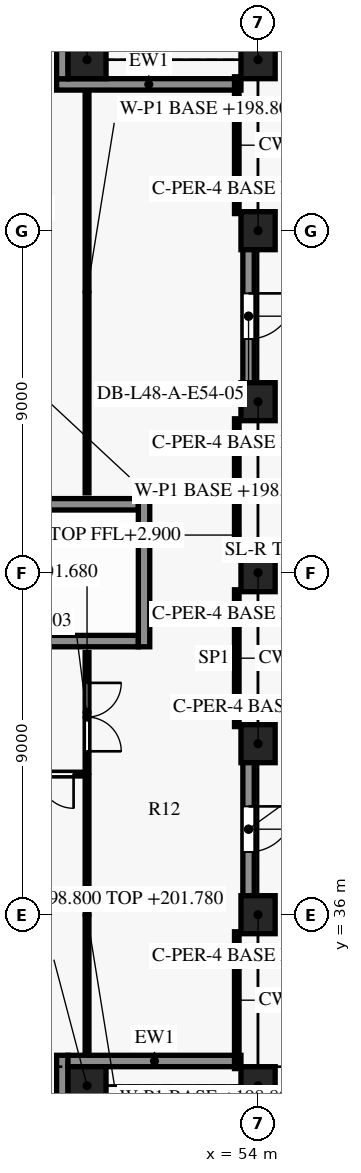
"""IFC4 building model, lengths in metres.
Left out: names, types, materials, properties, quantities, classifications, styles, units other than length and angle.
Written with IfcOpenShell. Run it as: python <this file> out.ifc"""

import sys

from ifc_helpers import new_model, si_unit, direction, frame, frame_2d, origin, origin_2d, place, context, subcontext, project, spatial, rectangle, extrude, element, fill, save


model = new_model("IFC4")
c1 = context("Model", 3, precision=1e-05, world=origin(), true_north=direction((0.0, 1.0)))
c2 = subcontext(c1, "Body", "Model", "MODEL_VIEW")
j1 = project(units=[si_unit("LENGTHUNIT", "METRE"), si_unit("PLANEANGLEUNIT", "RADIAN")], contexts=[c1])
p1 = place(None, origin())
s1 = spatial("IfcSite", under=j1, at=p1, CompositionType="ELEMENT")
p2 = place(p1, origin())
s2 = spatial("IfcBuilding", under=s1, at=p2, CompositionType="ELEMENT")
p3 = place(p2, frame((0.0, 0.0, 198.8)))
s3 = spatial("IfcBuildingStorey", under=s2, at=p3, CompositionType="ELEMENT", Elevation=198.8)
for number, where, z_axis, x_axis in (
    (1, (54.0, 31.5, -0.3), (0.0, 0.0, 1.0), (0.0, 1.0, 0.0)),
    (2, (54.0, 36.0, -0.3), (0.0, 0.0, 1.0), (0.0, 1.0, 0.0)),
    (3, (54.0, 40.5, -0.3), (0.0, 0.0, 1.0), (0.0, 1.0, 0.0)),
    (4, (54.0, 45.0, -0.3), (0.0, 0.0, 1.0), (0.0, 1.0, 0.0)),
    (5, (54.0, 49.5, -0.3), (0.0, 0.0, 1.0), (0.0, 1.0, 0.0)),
    (6, (54.0, 54.0, -0.3), (0.0, 0.0, 1.0), (0.0, 1.0, 0.0)),
    (7, (54.0, 58.5, -0.3), (0.0, 0.0, 1.0), (0.0, 1.0, 0.0)),
):
    element("IfcColumn", number, at=place(p3, frame(where, z_axis=z_axis, x_axis=x_axis)), inside=s3, PredefinedType="COLUMN", context=c2, shape_type="SweptSolid", body=[
        extrude(rectangle(XDim=0.9, YDim=1.0, at=origin_2d()), origin(), (0.0, 0.0, 1.0), 4.1),
    ])
for number, where, z_axis, x_axis in (
    (8, (49.5, 31.5, -0.3), (0.0, 0.0, 1.0), (1.0, 0.0, 0.0)),
    (9, (49.5, 58.5, -0.3), (0.0, 0.0, 1.0), (1.0, 0.0, 0.0)),
):
    element("IfcColumn", number, at=place(p3, frame(where, z_axis=z_axis, x_axis=x_axis)), inside=s3, PredefinedType="COLUMN", context=c2, shape_type="SweptSolid", body=[
        extrude(rectangle(XDim=1.0, YDim=1.0, at=origin_2d()), origin(), (0.0, 0.0, 1.0), 4.1),
    ])
p4 = place(p3, frame((48.85, 32.3, 0.0), z_axis=(0.0, 0.0, 1.0), x_axis=(0.0, -1.0, 0.0)))
e10 = element("IfcWall", 10, at=p4, inside=s3, PredefinedType="SOLIDWALL", context=c2, shape_type="SweptSolid", body=[
    extrude(rectangle(XDim=5.01, YDim=0.3, at=frame_2d((2.505, 0.0))), origin(), (0.0, 0.0, 1.0), 3.15),
])
p5 = place(p3, frame((53.55, 32.15, 0.0), z_axis=(0.0, 0.0, 1.0), x_axis=(-1.0, 0.0, 0.0)))
e11 = element("IfcWall", 11, at=p5, inside=s3, PredefinedType="SOLIDWALL", context=c2, shape_type="SweptSolid", body=[
    extrude(rectangle(XDim=4.552, YDim=0.3, at=frame_2d((2.276, 0.0))), origin(), (0.0, 0.0, 1.0), 3.15),
])
p6 = place(p3, frame((48.7, 57.85, 0.0), z_axis=(0.0, 0.0, 1.0), x_axis=(1.0, 0.0, 0.0)))
e12 = element("IfcWall", 12, at=p6, inside=s3, PredefinedType="SOLIDWALL", context=c2, shape_type="SweptSolid", body=[
    extrude(rectangle(XDim=4.85, YDim=0.3, at=frame_2d((2.425, 0.0))), origin(), (0.0, 0.0, 1.0), 3.15),
])
p7 = place(p3, frame((48.85, 62.998, 0.0), z_axis=(0.0, 0.0, 1.0), x_axis=(0.0, -1.0, 0.0)))
e13 = element("IfcWall", 13, at=p7, inside=s3, PredefinedType="SOLIDWALL", context=c2, shape_type="SweptSolid", body=[
    extrude(rectangle(XDim=5.0, YDim=0.3, at=frame_2d((2.5, 0.0))), origin(), (0.0, 0.0, 1.0), 3.15),
])
p8 = place(p3, frame((53.75, 40.05, 0.0), z_axis=(0.0, 0.0, 1.0), x_axis=(0.0, -1.0, 0.0)))
e14 = element("IfcWall", 14, at=p8, inside=s3, PredefinedType="SOLIDWALL", context=c2, shape_type="SweptSolid", body=[
    extrude(rectangle(XDim=3.6, YDim=0.3, at=frame_2d((1.8, 0.0))), origin(), (0.0, 0.0, 1.0), 3.15),
])
p9 = place(p8, frame((1.2, 0.0, 0.0)))
e15 = element("IfcOpeningElement", 15, at=p9, cuts=e14, PredefinedType="OPENING", context=c2, shape_type="SweptSolid", body=[
    extrude(rectangle(XDim=1.2, YDim=2.5, at=frame_2d((0.6, 1.25))), frame((0.0, 0.16, 0.0), z_axis=(0.0, -1.0, 0.0), x_axis=(1.0, 0.0, 0.0)), (0.0, 0.0, 1.0), 0.32),
])
p10 = place(p3, frame((53.75, 53.55, 0.0), z_axis=(0.0, 0.0, 1.0), x_axis=(0.0, -1.0, 0.0)))
e16 = element("IfcWall", 16, at=p10, inside=s3, PredefinedType="SOLIDWALL", context=c2, shape_type="SweptSolid", body=[
    extrude(rectangle(XDim=3.6, YDim=0.3, at=frame_2d((1.8, 0.0))), origin(), (0.0, 0.0, 1.0), 3.15),
])
p11 = place(p10, frame((1.2, 0.0, 0.0)))
e17 = element("IfcOpeningElement", 17, at=p11, cuts=e16, PredefinedType="OPENING", context=c2, shape_type="SweptSolid", body=[
    extrude(rectangle(XDim=1.2, YDim=2.5, at=frame_2d((0.6, 1.25))), frame((0.0, 0.16, 0.0), z_axis=(0.0, -1.0, 0.0), x_axis=(1.0, 0.0, 0.0)), (0.0, 0.0, 1.0), 0.32),
])
p12 = place(p3, frame((43.15, 43.2, 0.0), z_axis=(0.0, 0.0, 1.0), x_axis=(1.0, 0.0, 0.0)))
e18 = element("IfcWall", 18, at=p12, inside=s3, PredefinedType="SHEAR", context=c2, shape_type="SweptSolid", body=[
    extrude(rectangle(XDim=7.7, YDim=0.3, at=frame_2d((3.85, 0.0))), origin(), (0.0, 0.0, 1.0), 3.5),
])
p13 = place(p12, frame((0.25, 0.0, 0.0)))
e19 = element("IfcOpeningElement", 19, at=p13, cuts=e18, PredefinedType="OPENING", context=c2, shape_type="SweptSolid", body=[
    extrude(rectangle(XDim=1.2, YDim=2.2, at=frame_2d((0.6, 1.1))), frame((0.0, 0.16, 0.0), z_axis=(0.0, -1.0, 0.0), x_axis=(1.0, 0.0, 0.0)), (0.0, 0.0, 1.0), 0.32),
])
p14 = place(p3, frame((43.15, 46.8, 0.0), z_axis=(0.0, 0.0, 1.0), x_axis=(1.0, 0.0, 0.0)))
e20 = element("IfcWall", 20, at=p14, inside=s3, PredefinedType="SHEAR", context=c2, shape_type="SweptSolid", body=[
    extrude(rectangle(XDim=7.7, YDim=0.3, at=frame_2d((3.85, 0.0))), origin(), (0.0, 0.0, 1.0), 3.5),
])
p15 = place(p3, frame((51.0, 43.05, 0.0), z_axis=(0.0, 0.0, 1.0), x_axis=(0.0, 1.0, 0.0)))
e21 = element("IfcWall", 21, at=p15, inside=s3, PredefinedType="SHEAR", context=c2, shape_type="SweptSolid", body=[
    extrude(rectangle(XDim=3.9, YDim=0.3, at=frame_2d((1.95, 0.0))), origin(), (0.0, 0.0, 1.0), 3.5),
])
p16 = place(p3, frame((49.5, 32.32, 0.0), z_axis=(0.0, 0.0, 1.0), x_axis=(0.0, 1.0, 0.0)))
e22 = element("IfcWall", 22, at=p16, inside=s3, PredefinedType="PARTITIONING", context=c2, shape_type="SweptSolid", body=[
    extrude(rectangle(XDim=7.33, YDim=0.1, at=frame_2d((3.665, 0.0))), origin(), (0.0, 0.0, 1.0), 2.88),
])
p17 = place(p3, frame((49.45, 39.7, 0.0), z_axis=(0.0, 0.0, 1.0), x_axis=(-1.0, 0.0, 0.0)))
e23 = element("IfcWall", 23, at=p17, inside=s3, PredefinedType="PARTITIONING", context=c2, shape_type="SweptSolid", body=[
    extrude(rectangle(XDim=4.45, YDim=0.1, at=frame_2d((2.225, 0.0))), origin(), (0.0, 0.0, 1.0), 2.98),
])
p18 = place(p17, frame((0.304, 0.0, 0.0)))
e24 = element("IfcOpeningElement", 24, at=p18, cuts=e23, PredefinedType="OPENING", context=c2, shape_type="SweptSolid", body=[
    extrude(rectangle(XDim=1.8, YDim=2.1, at=frame_2d((0.9, 1.05))), frame((0.0, 0.06, 0.0), z_axis=(0.0, -1.0, 0.0), x_axis=(1.0, 0.0, 0.0)), (0.0, 0.0, 1.0), 0.12),
])
p19 = place(p3, frame((49.5, 42.9, 0.0), z_axis=(0.0, 0.0, 1.0), x_axis=(0.0, -1.0, 0.0)))
e25 = element("IfcWall", 25, at=p19, inside=s3, PredefinedType="PARTITIONING", context=c2, shape_type="SweptSolid", body=[
    extrude(rectangle(XDim=3.15, YDim=0.1, at=frame_2d((1.575, 0.0))), origin(), (0.0, 0.0, 1.0), 2.88),
])
p20 = place(p19, frame((0.8, 0.0, 0.0)))
e26 = element("IfcOpeningElement", 26, at=p20, cuts=e25, PredefinedType="OPENING", context=c2, shape_type="SweptSolid", body=[
    extrude(rectangle(XDim=1.8, YDim=2.1, at=frame_2d((0.9, 1.05))), frame((0.0, 0.06, 0.0), z_axis=(0.0, -1.0, 0.0), x_axis=(1.0, 0.0, 0.0)), (0.0, 0.0, 1.0), 0.12),
])
p21 = place(p3, frame((49.5, 47.1, 0.0), z_axis=(0.0, 0.0, 1.0), x_axis=(0.0, 1.0, 0.0)))
e27 = element("IfcWall", 27, at=p21, inside=s3, PredefinedType="PARTITIONING", context=c2, shape_type="SweptSolid", body=[
    extrude(rectangle(XDim=10.58, YDim=0.1, at=frame_2d((5.29, 0.0))), origin(), (0.0, 0.0, 1.0), 2.88),
])
p22 = place(p9, origin())
e28 = element("IfcDoor", 28, at=p22, inside=s3, OperationType="SINGLE_SWING_LEFT", PredefinedType="DOOR", context=c2, shape_type="SweptSolid", body=[
    extrude(rectangle(XDim=1.2, YDim=2.5, at=frame_2d((0.6, 1.25))), frame((0.0, 0.025, 0.0), z_axis=(0.0, -1.0, 0.0), x_axis=(1.0, 0.0, 0.0)), (0.0, 0.0, 1.0), 0.05),
])
fill(e15, e28)
p23 = place(p11, origin())
e29 = element("IfcDoor", 29, at=p23, inside=s3, OperationType="SINGLE_SWING_LEFT", PredefinedType="DOOR", context=c2, shape_type="SweptSolid", body=[
    extrude(rectangle(XDim=1.2, YDim=2.5, at=frame_2d((0.6, 1.25))), frame((0.0, 0.025, 0.0), z_axis=(0.0, -1.0, 0.0), x_axis=(1.0, 0.0, 0.0)), (0.0, 0.0, 1.0), 0.05),
])
fill(e17, e29)
p24 = place(p20, origin())
e30 = element("IfcDoor", 30, at=p24, inside=s3, OperationType="DOUBLE_DOOR_SINGLE_SWING", PredefinedType="DOOR", context=c2, shape_type="SweptSolid", body=[
    extrude(rectangle(XDim=1.8, YDim=2.1, at=frame_2d((0.9, 1.05))), frame((0.0, 0.025, 0.0), z_axis=(0.0, -1.0, 0.0), x_axis=(1.0, 0.0, 0.0)), (0.0, 0.0, 1.0), 0.05),
])
fill(e26, e30)
p25 = place(p18, origin())
e31 = element("IfcDoor", 31, at=p25, inside=s3, OperationType="DOUBLE_DOOR_SINGLE_SWING", PredefinedType="DOOR", context=c2, shape_type="SweptSolid", body=[
    extrude(rectangle(XDim=1.8, YDim=2.1, at=frame_2d((0.9, 1.05))), frame((0.0, 0.025, 0.0), z_axis=(0.0, -1.0, 0.0), x_axis=(1.0, 0.0, 0.0)), (0.0, 0.0, 1.0), 0.05),
])
fill(e24, e31)
save(model, sys.argv[1])
